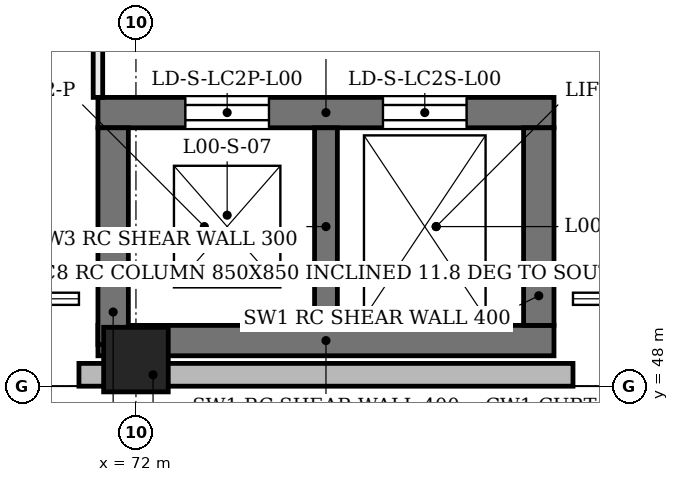
"""IFC4 building model, lengths in metres.
Left out: names, types, materials, properties, quantities, classifications, styles, units other than length and angle.
Written with IfcOpenShell. Run it as: python <this file> out.ifc"""

import sys

from ifc_helpers import new_model, si_unit, direction, frame, frame_2d, origin, origin_2d, place, context, subcontext, project, spatial, rectangle, extrude, element, fill, save


model = new_model("IFC4")
c1 = context("Model", 3, precision=1e-05, world=origin(), true_north=direction((0.0, 1.0)))
c2 = subcontext(c1, "Body", "Model", "MODEL_VIEW")
j1 = project(units=[si_unit("LENGTHUNIT", "METRE"), si_unit("PLANEANGLEUNIT", "RADIAN")], contexts=[c1])
p1 = place(None, origin())
s1 = spatial("IfcSite", under=j1, at=p1, CompositionType="ELEMENT")
p2 = place(p1, origin())
s2 = spatial("IfcBuilding", under=s1, at=p2, CompositionType="ELEMENT")
p3 = place(p2, origin())
s3 = spatial("IfcBuildingStorey", under=s2, at=p3, CompositionType="ELEMENT", Elevation=0.0)
p4 = place(p3, frame((71.5, 48.6, 0.0), z_axis=(0.0, 0.0, 1.0), x_axis=(1.0, 0.0, 0.0)))
e1 = element("IfcWall", 1, at=p4, inside=s3, PredefinedType="SHEAR", context=c2, shape_type="SweptSolid", body=[
    extrude(rectangle(XDim=6.0, YDim=0.4, at=frame_2d((3.0, 0.0))), origin(), (0.0, 0.0, 1.0), 4.58),
])
p5 = place(p3, frame((71.5, 51.6, 0.0), z_axis=(0.0, 0.0, 1.0), x_axis=(1.0, 0.0, 0.0)))
e2 = element("IfcWall", 2, at=p5, inside=s3, PredefinedType="SHEAR", context=c2, shape_type="SweptSolid", body=[
    extrude(rectangle(XDim=6.0, YDim=0.4, at=frame_2d((3.0, 0.0))), origin(), (0.0, 0.0, 1.0), 4.58),
])
p6 = place(p5, frame((1.15, 0.0, 0.0)))
e3 = element("IfcOpeningElement", 3, at=p6, cuts=e2, PredefinedType="OPENING", context=c2, shape_type="SweptSolid", body=[
    extrude(rectangle(XDim=1.1, YDim=2.1, at=frame_2d((0.55, 1.05))), frame((0.0, 0.21, 0.0), z_axis=(0.0, -1.0, 0.0), x_axis=(1.0, 0.0, 0.0)), (0.0, 0.0, 1.0), 0.42),
])
p7 = place(p5, frame((3.75, 0.0, 0.0)))
e4 = element("IfcOpeningElement", 4, at=p7, cuts=e2, PredefinedType="OPENING", context=c2, shape_type="SweptSolid", body=[
    extrude(rectangle(XDim=1.1, YDim=2.1, at=frame_2d((0.55, 1.05))), frame((0.0, 0.21, 0.0), z_axis=(0.0, -1.0, 0.0), x_axis=(1.0, 0.0, 0.0)), (0.0, 0.0, 1.0), 0.42),
])
p8 = place(p3, frame((71.7, 48.548, 0.0), z_axis=(0.0, 0.0, 1.0), x_axis=(0.0, 1.0, 0.0)))
e5 = element("IfcWall", 5, at=p8, inside=s3, PredefinedType="SHEAR", context=c2, shape_type="SweptSolid", body=[
    extrude(rectangle(XDim=2.852, YDim=0.4, at=frame_2d((1.426, 0.0))), origin(), (0.0, 0.0, 1.0), 4.58),
])
p9 = place(p3, frame((77.3, 48.8, 0.0), z_axis=(0.0, 0.0, 1.0), x_axis=(0.0, 1.0, 0.0)))
e6 = element("IfcWall", 6, at=p9, inside=s3, PredefinedType="SHEAR", context=c2, shape_type="SweptSolid", body=[
    extrude(rectangle(XDim=2.6, YDim=0.4, at=frame_2d((1.3, 0.0))), origin(), (0.0, 0.0, 1.0), 4.58),
])
p10 = place(p3, frame((74.5, 48.8, 0.0), z_axis=(0.0, 0.0, 1.0), x_axis=(0.0, 1.0, 0.0)))
e7 = element("IfcWall", 7, at=p10, inside=s3, PredefinedType="SHEAR", context=c2, shape_type="SweptSolid", body=[
    extrude(rectangle(XDim=2.6, YDim=0.3, at=frame_2d((1.3, 0.0))), origin(), (0.0, 0.0, 1.0), 4.58),
])
p11 = place(p3, frame((72.0, 48.6, 0.0), z_axis=(0.0, -0.203952265704, 0.978980833987), x_axis=(1.0, 0.0, 0.0)))
e8 = element("IfcColumn", 8, at=p11, inside=s3, PredefinedType="COLUMN", context=c2, shape_type="SweptSolid", body=[
    extrude(rectangle(XDim=0.85, YDim=0.85, at=origin_2d()), origin(), (0.0, 0.0, 1.0), 4.903),
])
p12 = place(p3, frame((71.25, 48.15, 0.0), z_axis=(0.0, 0.0, 1.0), x_axis=(1.0, 0.0, 0.0)))
e9 = element("IfcWall", 9, at=p12, inside=s3, PredefinedType="SOLIDWALL", context=c2, shape_type="SweptSolid", body=[
    extrude(rectangle(XDim=6.5, YDim=0.3, at=frame_2d((3.25, 0.0))), origin(), (0.0, 0.0, 1.0), 3.9),
])
p13 = place(p3, frame((71.5, 51.8, 0.0), z_axis=(0.0, 0.0, 1.0), x_axis=(0.0, 1.0, 0.0)))
e10 = element("IfcWall", 10, at=p13, inside=s3, PredefinedType="PARTITIONING", context=c2, shape_type="SweptSolid", body=[
    extrude(rectangle(XDim=5.15, YDim=0.125, at=frame_2d((2.575, 0.0))), origin(), (0.0, 0.0, 1.0), 4.08),
])
p14 = place(p6, origin())
e11 = element("IfcDoor", 11, at=p14, inside=s3, OperationType="DOUBLE_DOOR_SLIDING", PredefinedType="DOOR", context=c2, shape_type="SweptSolid", body=[
    extrude(rectangle(XDim=1.1, YDim=2.1, at=frame_2d((0.55, 1.05))), frame((0.0, 0.025, 0.0), z_axis=(0.0, -1.0, 0.0), x_axis=(1.0, 0.0, 0.0)), (0.0, 0.0, 1.0), 0.05),
])
fill(e3, e11)
p15 = place(p7, origin())
e12 = element("IfcDoor", 12, at=p15, inside=s3, OperationType="DOUBLE_DOOR_SLIDING", PredefinedType="DOOR", context=c2, shape_type="SweptSolid", body=[
    extrude(rectangle(XDim=1.1, YDim=2.1, at=frame_2d((0.55, 1.05))), frame((0.0, 0.025, 0.0), z_axis=(0.0, -1.0, 0.0), x_axis=(1.0, 0.0, 0.0)), (0.0, 0.0, 1.0), 0.05),
])
fill(e4, e12)
save(model, sys.argv[1])
